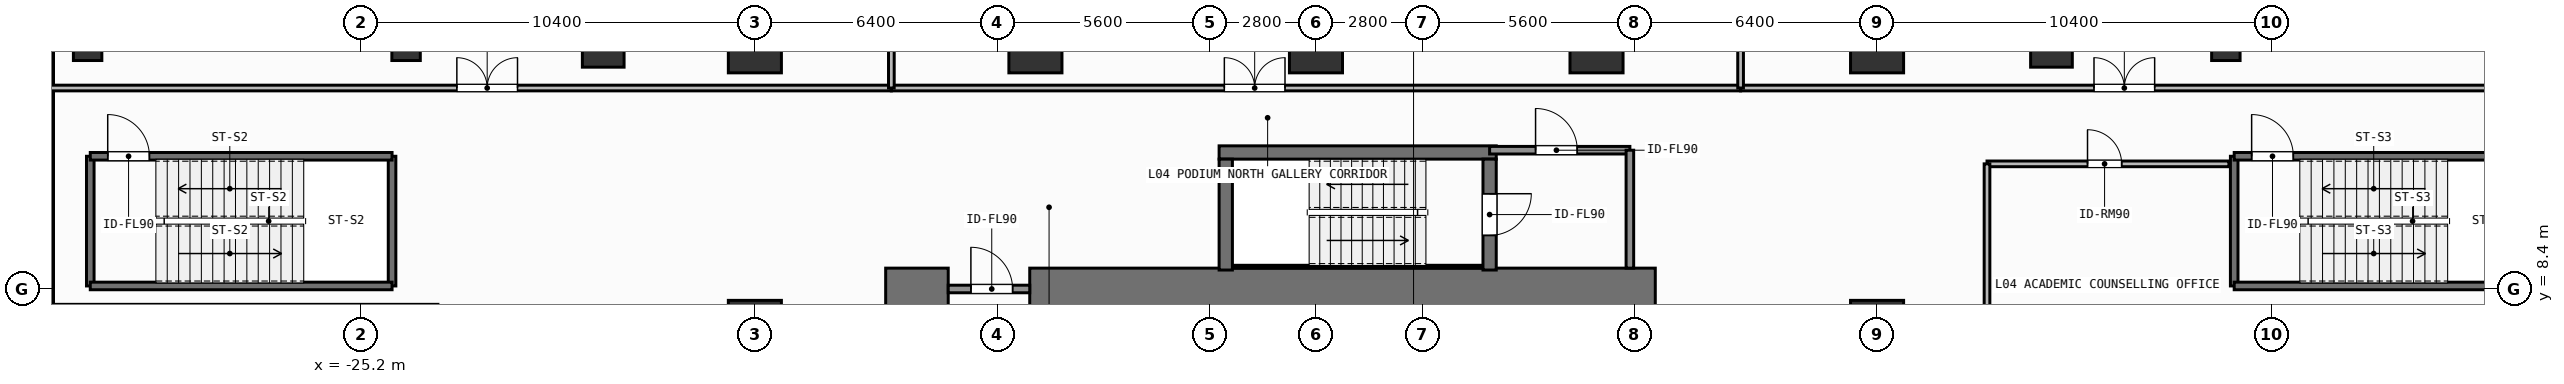
"""IFC4 building model, lengths in metres.
Left out: names, types, materials, properties, quantities, classifications, styles, units other than length and angle.
Written with IfcOpenShell. Run it as: python <this file> out.ifc"""

import sys

from ifc_helpers import new_model, si_unit, direction, frame, frame_2d, origin, origin_2d, place, context, subcontext, project, spatial, rectangle, extrude, element, fill, save


model = new_model("IFC4")
c1 = context("Model", 3, precision=1e-05, world=origin(), true_north=direction((0.0, 1.0)))
c2 = subcontext(c1, "Body", "Model", "MODEL_VIEW")
j1 = project(units=[si_unit("LENGTHUNIT", "METRE"), si_unit("PLANEANGLEUNIT", "RADIAN")], contexts=[c1])
p1 = place(None, origin())
s1 = spatial("IfcSite", under=j1, at=p1, CompositionType="ELEMENT")
p2 = place(p1, origin())
s2 = spatial("IfcBuilding", under=s1, at=p2, CompositionType="ELEMENT")
p3 = place(p2, frame((0.0, 0.0, 13.2)))
s3 = spatial("IfcBuildingStorey", under=s2, at=p3, CompositionType="ELEMENT", Elevation=13.2)
p4 = place(p3, frame((-11.35, 8.4, 0.0), z_axis=(0.0, 0.0, 1.0), x_axis=(1.0, 0.0, 0.0)))
e1 = element("IfcWall", 1, at=p4, inside=s3, PredefinedType="SHEAR", context=c2, shape_type="SweptSolid", body=[
    extrude(rectangle(XDim=1.65, YDim=1.1, at=frame_2d((0.825, 0.0))), origin(), (0.0, 0.0, 1.0), 4.2),
])
p5 = place(p3, frame((-7.55, 8.4, 0.0), z_axis=(0.0, 0.0, 1.0), x_axis=(1.0, 0.0, 0.0)))
e2 = element("IfcWall", 2, at=p5, inside=s3, PredefinedType="SHEAR", context=c2, shape_type="SweptSolid", body=[
    extrude(rectangle(XDim=16.5, YDim=1.1, at=frame_2d((8.25, 0.0))), origin(), (0.0, 0.0, 1.0), 4.2),
])
p6 = place(p3, frame((-2.555, 12.0, 0.0), z_axis=(0.0, 0.0, 1.0), x_axis=(1.0, 0.0, 0.0)))
e3 = element("IfcWall", 3, at=p6, inside=s3, PredefinedType="SHEAR", context=c2, shape_type="SweptSolid", body=[
    extrude(rectangle(XDim=7.31, YDim=0.35, at=frame_2d((3.655, 0.0))), origin(), (0.0, 0.0, 1.0), 4.2),
])
p7 = place(p3, frame((-2.2, 8.988, 0.0), z_axis=(0.0, 0.0, 1.0), x_axis=(1.0, 0.0, 0.0)))
e4 = element("IfcWall", 4, at=p7, inside=s3, PredefinedType="SHEAR", context=c2, shape_type="SweptSolid", body=[
    extrude(rectangle(XDim=6.6, YDim=0.075, at=frame_2d((3.3, 0.0))), origin(), (0.0, 0.0, 1.0), 4.2),
])
p8 = place(p3, frame((-2.38, 8.9, 0.0), z_axis=(0.0, 0.0, 1.0), x_axis=(0.0, 1.0, 0.0)))
e5 = element("IfcWall", 5, at=p8, inside=s3, PredefinedType="SHEAR", context=c2, shape_type="SweptSolid", body=[
    extrude(rectangle(XDim=2.925, YDim=0.35, at=frame_2d((1.462, 0.0))), origin(), (0.0, 0.0, 1.0), 4.2),
])
p9 = place(p3, frame((4.58, 11.825, 0.0), z_axis=(0.0, 0.0, 1.0), x_axis=(0.0, -1.0, 0.0)))
e6 = element("IfcWall", 6, at=p9, inside=s3, PredefinedType="SHEAR", context=c2, shape_type="SweptSolid", body=[
    extrude(rectangle(XDim=2.925, YDim=0.35, at=frame_2d((1.462, 0.0))), origin(), (0.0, 0.0, 1.0), 4.2),
])
p10 = place(p9, frame((0.913, 0.0, 0.0)))
e7 = element("IfcOpeningElement", 7, at=p10, cuts=e6, PredefinedType="OPENING", context=c2, shape_type="SweptSolid", body=[
    extrude(rectangle(XDim=1.1, YDim=2.15, at=frame_2d((0.55, 1.075))), frame((0.0, 0.185, 0.0), z_axis=(0.0, -1.0, 0.0), x_axis=(1.0, 0.0, 0.0)), (0.0, 0.0, 1.0), 0.37),
])
for number, where, z_axis, x_axis in (
    (8, (-14.8, 14.8, 0.0), (0.0, 0.0, 1.0), (1.0, 0.0, 0.0)),
    (9, (-7.4, 14.8, 0.0), (0.0, 0.0, 1.0), (1.0, 0.0, 0.0)),
    (10, (0.0, 14.8, 0.0), (0.0, 0.0, 1.0), (1.0, 0.0, 0.0)),
    (11, (7.4, 14.8, 0.0), (0.0, 0.0, 1.0), (1.0, 0.0, 0.0)),
    (12, (14.8, 14.8, 0.0), (0.0, 0.0, 1.0), (1.0, 0.0, 0.0)),
    (13, (-14.8, 7.4, 0.0), (0.0, 0.0, 1.0), (1.0, 0.0, 0.0)),
    (14, (14.8, 7.4, 0.0), (0.0, 0.0, 1.0), (1.0, 0.0, 0.0)),
):
    element("IfcColumn", number, at=place(p3, frame(where, z_axis=z_axis, x_axis=x_axis)), inside=s3, PredefinedType="COLUMN", context=c2, shape_type="SweptSolid", body=[
        extrude(rectangle(XDim=1.4, YDim=1.4, at=origin_2d()), origin(), (0.0, 0.0, 1.0), 4.2),
    ])
for number, where, z_axis, x_axis in (
    (15, (-18.8, 14.8, 0.0), (0.0, 0.0, 1.0), (1.0, 0.0, 0.0)),
    (16, (19.4, 14.8, 0.0), (0.0, 0.0, 1.0), (1.0, 0.0, 0.0)),
):
    element("IfcColumn", number, at=place(p3, frame(where, z_axis=z_axis, x_axis=x_axis)), inside=s3, PredefinedType="COLUMN", context=c2, shape_type="SweptSolid", body=[
        extrude(rectangle(XDim=1.1, YDim=1.1, at=origin_2d()), origin(), (0.0, 0.0, 1.0), 4.2),
    ])
for number, where, z_axis, x_axis in (
    (17, (-32.4, 14.8, 0.0), (0.0, 0.0, 1.0), (1.0, 0.0, 0.0)),
    (18, (-24.0, 14.8, 0.0), (0.0, 0.0, 1.0), (1.0, 0.0, 0.0)),
    (19, (24.0, 14.8, 0.0), (0.0, 0.0, 1.0), (1.0, 0.0, 0.0)),
):
    element("IfcColumn", number, at=place(p3, frame(where, z_axis=z_axis, x_axis=x_axis)), inside=s3, PredefinedType="COLUMN", context=c2, shape_type="SweptSolid", body=[
        extrude(rectangle(XDim=0.75, YDim=0.75, at=origin_2d()), origin(), (0.0, 0.0, 1.0), 4.2),
    ])
p11 = place(p3, frame((-33.45, 6.41, 0.0), z_axis=(0.0, 0.0, 1.0), x_axis=(0.0, 1.0, 0.0)))
e20 = element("IfcWall", 20, at=p11, inside=s3, PredefinedType="SOLIDWALL", context=c2, shape_type="SweptSolid", body=[
    extrude(rectangle(XDim=14.09, YDim=0.3, at=frame_2d((7.045, 0.0))), origin(), (0.0, 0.0, 1.0), 3.96),
])
for number, where, z_axis, x_axis in (
    (21, (-32.33, 8.48, 0.0), (0.0, 0.0, 1.0), (0.0, 1.0, 0.0)),
    (22, (-24.37, 11.9, 0.0), (0.0, 0.0, 1.0), (0.0, -1.0, 0.0)),
):
    element("IfcWall", number, at=place(p3, frame(where, z_axis=z_axis, x_axis=x_axis)), inside=s3, PredefinedType="SHEAR", context=c2, shape_type="SweptSolid", body=[
        extrude(rectangle(XDim=3.42, YDim=0.2, at=frame_2d((1.71, 0.0))), origin(), (0.0, 0.0, 1.0), 3.96),
    ])
p12 = place(p3, frame((-24.37, 8.48, 0.0), z_axis=(0.0, 0.0, 1.0), x_axis=(-1.0, 0.0, 0.0)))
e23 = element("IfcWall", 23, at=p12, inside=s3, PredefinedType="SHEAR", context=c2, shape_type="SweptSolid", body=[
    extrude(rectangle(XDim=7.96, YDim=0.2, at=frame_2d((3.98, 0.0))), origin(), (0.0, 0.0, 1.0), 3.96),
])
p13 = place(p3, frame((-32.33, 11.9, 0.0), z_axis=(0.0, 0.0, 1.0), x_axis=(1.0, 0.0, 0.0)))
e24 = element("IfcWall", 24, at=p13, inside=s3, PredefinedType="SHEAR", context=c2, shape_type="SweptSolid", body=[
    extrude(rectangle(XDim=7.96, YDim=0.2, at=frame_2d((3.98, 0.0))), origin(), (0.0, 0.0, 1.0), 3.96),
])
p14 = place(p13, frame((0.46, 0.0, 0.0)))
e25 = element("IfcOpeningElement", 25, at=p14, cuts=e24, PredefinedType="OPENING", context=c2, shape_type="SweptSolid", body=[
    extrude(rectangle(XDim=1.1, YDim=2.15, at=frame_2d((0.55, 1.075))), frame((0.0, 0.11, 0.0), z_axis=(0.0, -1.0, 0.0), x_axis=(1.0, 0.0, 0.0)), (0.0, 0.0, 1.0), 0.22),
])
p15 = place(p3, frame((24.22, 8.48, 0.0), z_axis=(0.0, 0.0, 1.0), x_axis=(0.0, 1.0, 0.0)))
e26 = element("IfcWall", 26, at=p15, inside=s3, PredefinedType="SHEAR", context=c2, shape_type="SweptSolid", body=[
    extrude(rectangle(XDim=3.42, YDim=0.2, at=frame_2d((1.71, 0.0))), origin(), (0.0, 0.0, 1.0), 3.96),
])
p16 = place(p3, frame((32.18, 8.48, 0.0), z_axis=(0.0, 0.0, 1.0), x_axis=(-1.0, 0.0, 0.0)))
e27 = element("IfcWall", 27, at=p16, inside=s3, PredefinedType="SHEAR", context=c2, shape_type="SweptSolid", body=[
    extrude(rectangle(XDim=7.96, YDim=0.2, at=frame_2d((3.98, 0.0))), origin(), (0.0, 0.0, 1.0), 3.96),
])
p17 = place(p3, frame((24.22, 11.9, 0.0), z_axis=(0.0, 0.0, 1.0), x_axis=(1.0, 0.0, 0.0)))
e28 = element("IfcWall", 28, at=p17, inside=s3, PredefinedType="SHEAR", context=c2, shape_type="SweptSolid", body=[
    extrude(rectangle(XDim=7.96, YDim=0.2, at=frame_2d((3.98, 0.0))), origin(), (0.0, 0.0, 1.0), 3.96),
])
p18 = place(p17, frame((0.46, 0.0, 0.0)))
e29 = element("IfcOpeningElement", 29, at=p18, cuts=e28, PredefinedType="OPENING", context=c2, shape_type="SweptSolid", body=[
    extrude(rectangle(XDim=1.1, YDim=2.15, at=frame_2d((0.55, 1.075))), frame((0.0, 0.11, 0.0), z_axis=(0.0, -1.0, 0.0), x_axis=(1.0, 0.0, 0.0)), (0.0, 0.0, 1.0), 0.22),
])
p19 = place(p3, frame((4.58, 12.06, 0.0), z_axis=(0.0, 0.0, 1.0), x_axis=(1.0, 0.0, 0.0)))
e30 = element("IfcWall", 30, at=p19, inside=s3, PredefinedType="SOLIDWALL", context=c2, shape_type="SweptSolid", body=[
    extrude(rectangle(XDim=3.7, YDim=0.2, at=frame_2d((1.85, 0.0))), origin(), (0.0, 0.0, 1.0), 3.96),
])
p20 = place(p19, frame((1.212, 0.0, 0.0)))
e31 = element("IfcOpeningElement", 31, at=p20, cuts=e30, PredefinedType="OPENING", context=c2, shape_type="SweptSolid", body=[
    extrude(rectangle(XDim=1.1, YDim=2.15, at=frame_2d((0.55, 1.075))), frame((0.0, 0.11, 0.0), z_axis=(0.0, -1.0, 0.0), x_axis=(1.0, 0.0, 0.0)), (0.0, 0.0, 1.0), 0.22),
])
p21 = place(p3, frame((-9.7, 8.4, 0.0), z_axis=(0.0, 0.0, 1.0), x_axis=(1.0, 0.0, 0.0)))
e32 = element("IfcWall", 32, at=p21, inside=s3, PredefinedType="SOLIDWALL", context=c2, shape_type="SweptSolid", body=[
    extrude(rectangle(XDim=2.15, YDim=0.2, at=frame_2d((1.075, 0.0))), origin(), (0.0, 0.0, 1.0), 3.0),
])
p22 = place(p21, frame((0.598, 0.0, 0.0)))
e33 = element("IfcOpeningElement", 33, at=p22, cuts=e32, PredefinedType="OPENING", context=c2, shape_type="SweptSolid", body=[
    extrude(rectangle(XDim=1.1, YDim=2.15, at=frame_2d((0.55, 1.075))), frame((0.0, 0.11, 0.0), z_axis=(0.0, -1.0, 0.0), x_axis=(1.0, 0.0, 0.0)), (0.0, 0.0, 1.0), 0.22),
])
p23 = place(p3, frame((-33.42, 13.7, 0.0), z_axis=(0.0, 0.0, 1.0), x_axis=(1.0, 0.0, 0.0)))
e34 = element("IfcWall", 34, at=p23, inside=s3, PredefinedType="PARTITIONING", context=c2, shape_type="SweptSolid", body=[
    extrude(rectangle(XDim=22.22, YDim=0.15, at=frame_2d((11.11, 0.0))), origin(), (0.0, 0.0, 1.0), 3.96),
])
p24 = place(p23, frame((10.759, 0.0, 0.0)))
e35 = element("IfcOpeningElement", 35, at=p24, cuts=e34, PredefinedType="OPENING", context=c2, shape_type="SweptSolid", body=[
    extrude(rectangle(XDim=1.6, YDim=2.3, at=frame_2d((0.8, 1.15))), frame((0.0, 0.085, 0.0), z_axis=(0.0, -1.0, 0.0), x_axis=(1.0, 0.0, 0.0)), (0.0, 0.0, 1.0), 0.17),
])
p25 = place(p3, frame((-11.2, 13.7, 0.0), z_axis=(0.0, 0.0, 1.0), x_axis=(1.0, 0.0, 0.0)))
e36 = element("IfcWall", 36, at=p25, inside=s3, PredefinedType="PARTITIONING", context=c2, shape_type="SweptSolid", body=[
    extrude(rectangle(XDim=22.4, YDim=0.15, at=frame_2d((11.2, 0.0))), origin(), (0.0, 0.0, 1.0), 3.96),
])
p26 = place(p25, frame((8.783, 0.0, 0.0)))
e37 = element("IfcOpeningElement", 37, at=p26, cuts=e36, PredefinedType="OPENING", context=c2, shape_type="SweptSolid", body=[
    extrude(rectangle(XDim=1.6, YDim=2.3, at=frame_2d((0.8, 1.15))), frame((0.0, 0.085, 0.0), z_axis=(0.0, -1.0, 0.0), x_axis=(1.0, 0.0, 0.0)), (0.0, 0.0, 1.0), 0.17),
])
p27 = place(p3, frame((11.2, 13.7, 0.0), z_axis=(0.0, 0.0, 1.0), x_axis=(1.0, 0.0, 0.0)))
e38 = element("IfcWall", 38, at=p27, inside=s3, PredefinedType="PARTITIONING", context=c2, shape_type="SweptSolid", body=[
    extrude(rectangle(XDim=22.22, YDim=0.15, at=frame_2d((11.11, 0.0))), origin(), (0.0, 0.0, 1.0), 3.96),
])
p28 = place(p27, frame((9.322, 0.0, 0.0)))
e39 = element("IfcOpeningElement", 39, at=p28, cuts=e38, PredefinedType="OPENING", context=c2, shape_type="SweptSolid", body=[
    extrude(rectangle(XDim=1.6, YDim=2.3, at=frame_2d((0.8, 1.15))), frame((0.0, 0.085, 0.0), z_axis=(0.0, -1.0, 0.0), x_axis=(1.0, 0.0, 0.0)), (0.0, 0.0, 1.0), 0.17),
])
p29 = place(p3, frame((17.7, 11.7, 0.0), z_axis=(0.0, 0.0, 1.0), x_axis=(1.0, 0.0, 0.0)))
e40 = element("IfcWall", 40, at=p29, inside=s3, PredefinedType="PARTITIONING", context=c2, shape_type="SweptSolid", body=[
    extrude(rectangle(XDim=6.38, YDim=0.15, at=frame_2d((3.19, 0.0))), origin(), (0.0, 0.0, 1.0), 3.96),
])
p30 = place(p29, frame((2.651, 0.0, 0.0)))
e41 = element("IfcOpeningElement", 41, at=p30, cuts=e40, PredefinedType="OPENING", context=c2, shape_type="SweptSolid", body=[
    extrude(rectangle(XDim=0.9, YDim=2.1, at=frame_2d((0.45, 1.05))), frame((0.0, 0.085, 0.0), z_axis=(0.0, -1.0, 0.0), x_axis=(1.0, 0.0, 0.0)), (0.0, 0.0, 1.0), 0.17),
])
p31 = place(p3, frame((8.28, 8.95, 0.0), z_axis=(0.0, 0.0, 1.0), x_axis=(0.0, 1.0, 0.0)))
e42 = element("IfcWall", 42, at=p31, inside=s3, PredefinedType="SOLIDWALL", context=c2, shape_type="SweptSolid", body=[
    extrude(rectangle(XDim=3.11, YDim=0.2, at=frame_2d((1.555, 0.0))), origin(), (0.0, 0.0, 1.0), 3.96),
])
for number, where, z_axis, x_axis in (
    (43, (-11.2, 13.7, 0.0), (0.0, 0.0, 1.0), (0.0, 1.0, 0.0)),
    (44, (11.2, 13.7, 0.0), (0.0, 0.0, 1.0), (0.0, 1.0, 0.0)),
):
    element("IfcWall", number, at=place(p3, frame(where, z_axis=z_axis, x_axis=x_axis)), inside=s3, PredefinedType="PARTITIONING", context=c2, shape_type="SweptSolid", body=[
        extrude(rectangle(XDim=11.22, YDim=0.15, at=frame_2d((5.61, 0.0))), origin(), (0.0, 0.0, 1.0), 3.96),
    ])
p32 = place(p3, frame((-33.42, 7.92, 0.0), z_axis=(0.0, 0.0, 1.0), x_axis=(1.0, 0.0, 0.0)))
e45 = element("IfcWall", 45, at=p32, inside=s3, PredefinedType="PARTITIONING", context=c2, shape_type="SweptSolid", body=[
    extrude(rectangle(XDim=10.26, YDim=0.15, at=frame_2d((5.13, 0.0))), origin(), (0.0, 0.0, 1.0), 3.96),
])
p33 = place(p3, frame((17.7, 5.28, 0.0), z_axis=(0.0, 0.0, 1.0), x_axis=(0.0, 1.0, 0.0)))
e46 = element("IfcWall", 46, at=p33, inside=s3, PredefinedType="PARTITIONING", context=c2, shape_type="SweptSolid", body=[
    extrude(rectangle(XDim=6.42, YDim=0.15, at=frame_2d((3.21, 0.0))), origin(), (0.0, 0.0, 1.0), 3.96),
])
p34 = place(p10, origin())
e47 = element("IfcDoor", 47, at=p34, inside=s3, OperationType="SINGLE_SWING_LEFT", PredefinedType="DOOR", context=c2, shape_type="SweptSolid", body=[
    extrude(rectangle(XDim=1.1, YDim=2.15, at=frame_2d((0.55, 1.075))), frame((0.0, 0.025, 0.0), z_axis=(0.0, -1.0, 0.0), x_axis=(1.0, 0.0, 0.0)), (0.0, 0.0, 1.0), 0.05),
])
fill(e7, e47)
p35 = place(p14, origin())
e48 = element("IfcDoor", 48, at=p35, inside=s3, OperationType="SINGLE_SWING_LEFT", PredefinedType="DOOR", context=c2, shape_type="SweptSolid", body=[
    extrude(rectangle(XDim=1.1, YDim=2.15, at=frame_2d((0.55, 1.075))), frame((0.0, 0.025, 0.0), z_axis=(0.0, -1.0, 0.0), x_axis=(1.0, 0.0, 0.0)), (0.0, 0.0, 1.0), 0.05),
])
fill(e25, e48)
p36 = place(p18, origin())
e49 = element("IfcDoor", 49, at=p36, inside=s3, OperationType="SINGLE_SWING_LEFT", PredefinedType="DOOR", context=c2, shape_type="SweptSolid", body=[
    extrude(rectangle(XDim=1.1, YDim=2.15, at=frame_2d((0.55, 1.075))), frame((0.0, 0.025, 0.0), z_axis=(0.0, -1.0, 0.0), x_axis=(1.0, 0.0, 0.0)), (0.0, 0.0, 1.0), 0.05),
])
fill(e29, e49)
p37 = place(p20, origin())
e50 = element("IfcDoor", 50, at=p37, inside=s3, OperationType="SINGLE_SWING_LEFT", PredefinedType="DOOR", context=c2, shape_type="SweptSolid", body=[
    extrude(rectangle(XDim=1.1, YDim=2.15, at=frame_2d((0.55, 1.075))), frame((0.0, 0.025, 0.0), z_axis=(0.0, -1.0, 0.0), x_axis=(1.0, 0.0, 0.0)), (0.0, 0.0, 1.0), 0.05),
])
fill(e31, e50)
p38 = place(p22, origin())
e51 = element("IfcDoor", 51, at=p38, inside=s3, OperationType="SINGLE_SWING_LEFT", PredefinedType="DOOR", context=c2, shape_type="SweptSolid", body=[
    extrude(rectangle(XDim=1.1, YDim=2.15, at=frame_2d((0.55, 1.075))), frame((0.0, 0.025, 0.0), z_axis=(0.0, -1.0, 0.0), x_axis=(1.0, 0.0, 0.0)), (0.0, 0.0, 1.0), 0.05),
])
fill(e33, e51)
p39 = place(p24, origin())
e52 = element("IfcDoor", 52, at=p39, inside=s3, OperationType="SINGLE_SWING_LEFT", PredefinedType="DOOR", context=c2, shape_type="SweptSolid", body=[
    extrude(rectangle(XDim=1.6, YDim=2.3, at=frame_2d((0.8, 1.15))), frame((0.0, 0.025, 0.0), z_axis=(0.0, -1.0, 0.0), x_axis=(1.0, 0.0, 0.0)), (0.0, 0.0, 1.0), 0.05),
])
fill(e35, e52)
p40 = place(p26, origin())
e53 = element("IfcDoor", 53, at=p40, inside=s3, OperationType="SINGLE_SWING_LEFT", PredefinedType="DOOR", context=c2, shape_type="SweptSolid", body=[
    extrude(rectangle(XDim=1.6, YDim=2.3, at=frame_2d((0.8, 1.15))), frame((0.0, 0.025, 0.0), z_axis=(0.0, -1.0, 0.0), x_axis=(1.0, 0.0, 0.0)), (0.0, 0.0, 1.0), 0.05),
])
fill(e37, e53)
p41 = place(p28, origin())
e54 = element("IfcDoor", 54, at=p41, inside=s3, OperationType="SINGLE_SWING_LEFT", PredefinedType="DOOR", context=c2, shape_type="SweptSolid", body=[
    extrude(rectangle(XDim=1.6, YDim=2.3, at=frame_2d((0.8, 1.15))), frame((0.0, 0.025, 0.0), z_axis=(0.0, -1.0, 0.0), x_axis=(1.0, 0.0, 0.0)), (0.0, 0.0, 1.0), 0.05),
])
fill(e39, e54)
p42 = place(p30, origin())
e55 = element("IfcDoor", 55, at=p42, inside=s3, OperationType="SINGLE_SWING_LEFT", PredefinedType="DOOR", context=c2, shape_type="SweptSolid", body=[
    extrude(rectangle(XDim=0.9, YDim=2.1, at=frame_2d((0.45, 1.05))), frame((0.0, 0.025, 0.0), z_axis=(0.0, -1.0, 0.0), x_axis=(1.0, 0.0, 0.0)), (0.0, 0.0, 1.0), 0.05),
])
fill(e41, e55)
save(model, sys.argv[1])
